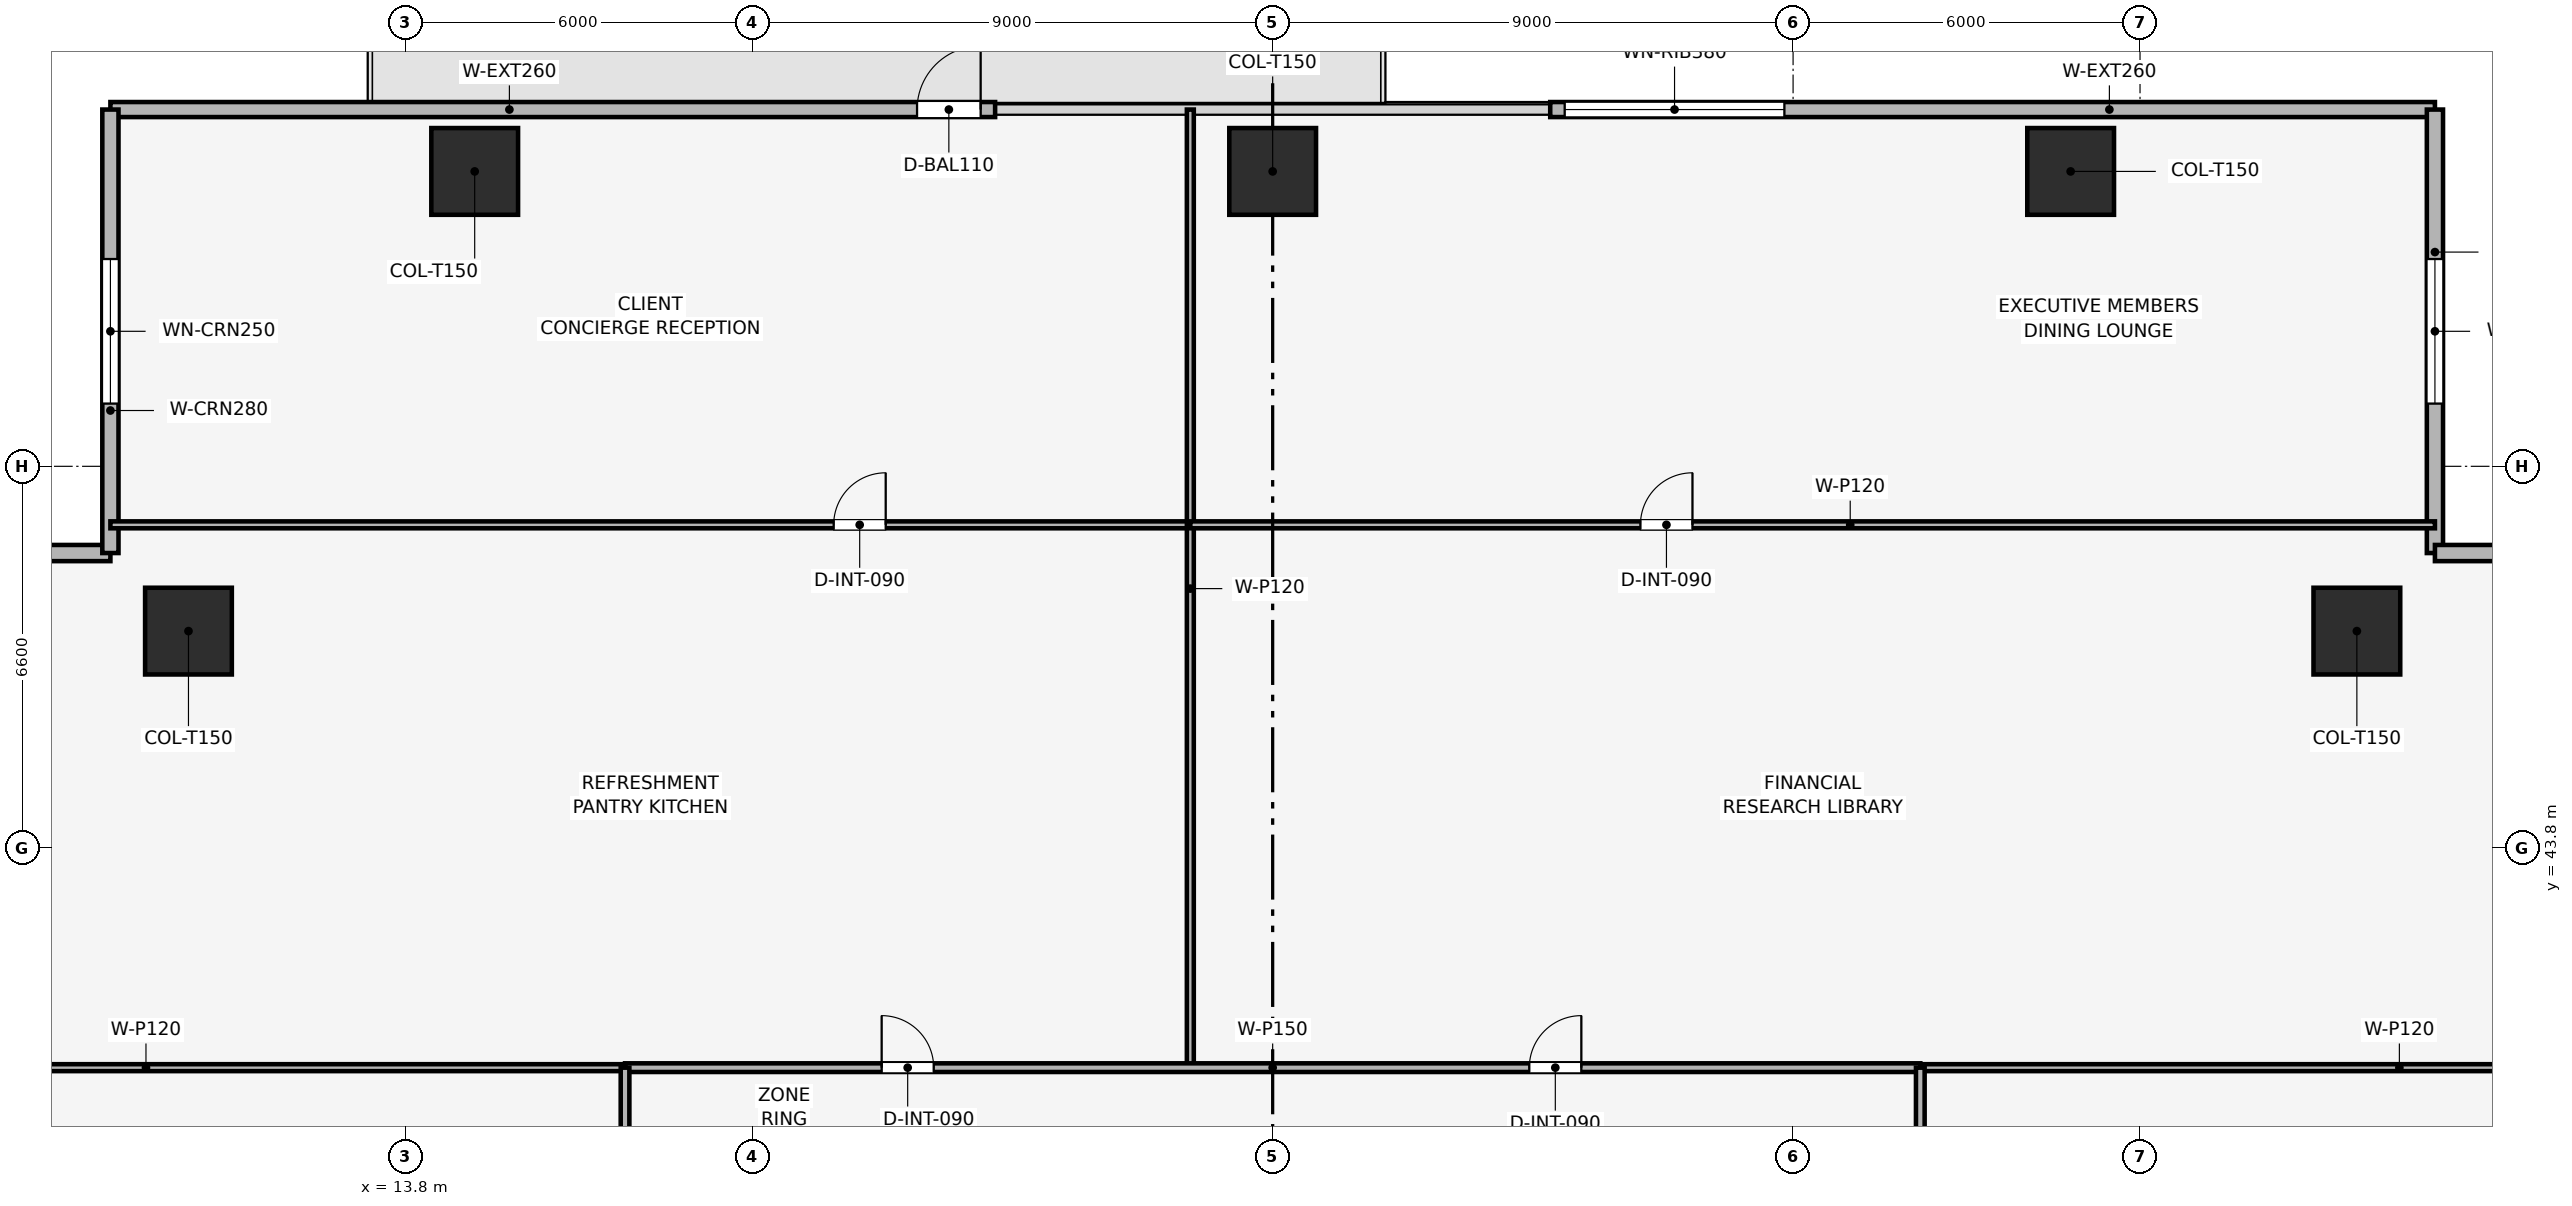
"""IFC4 building model, lengths in metres.
Left out: names, types, materials, properties, quantities, classifications, styles, units other than length and angle.
Written with IfcOpenShell. Run it as: python <this file> out.ifc"""

import sys

from ifc_helpers import new_model, si_unit, direction, frame, frame_2d, origin, origin_2d, place, context, subcontext, project, spatial, rectangle, extrude, element, fill, save


model = new_model("IFC4")
c1 = context("Model", 3, precision=1e-05, world=origin(), true_north=direction((0.0, 1.0)))
c2 = subcontext(c1, "Body", "Model", "MODEL_VIEW")
j1 = project(units=[si_unit("LENGTHUNIT", "METRE"), si_unit("PLANEANGLEUNIT", "RADIAN")], contexts=[c1])
p1 = place(None, origin())
s1 = spatial("IfcSite", under=j1, at=p1, CompositionType="ELEMENT")
p2 = place(p1, origin())
s2 = spatial("IfcBuilding", under=s1, at=p2, CompositionType="ELEMENT")
p3 = place(p2, frame((0.0, 0.0, 49.5)))
s3 = spatial("IfcBuildingStorey", under=s2, at=p3, CompositionType="ELEMENT", Elevation=49.5)
for number, where, z_axis, x_axis in (
    (1, (42.6, 55.5, 0.003), (0.0, 0.0, 1.0), (1.0, 0.0, 0.0)),
    (2, (28.8, 55.5, 0.003), (0.0, 0.0, 1.0), (1.0, 0.0, 0.0)),
    (3, (15.0, 55.5, 0.003), (0.0, 0.0, 1.0), (1.0, 0.0, 0.0)),
    (4, (47.55, 47.55, 0.003), (0.0, 0.0, 1.0), (1.0, 0.0, 0.0)),
    (5, (10.05, 47.55, 0.003), (0.0, 0.0, 1.0), (1.0, 0.0, 0.0)),
):
    element("IfcColumn", number, at=place(p3, frame(where, z_axis=z_axis, x_axis=x_axis)), inside=s3, PredefinedType="COLUMN", context=c2, shape_type="SweptSolid", body=[
        extrude(rectangle(XDim=1.5, YDim=1.5, at=origin_2d()), origin(), (0.0, 0.0, 1.0), 3.644),
    ])
p4 = place(p3, frame((8.7, 56.57, 0.0), z_axis=(0.0, 0.0, 1.0), x_axis=(1.0, 0.0, 0.0)))
e6 = element("IfcWall", 6, at=p4, inside=s3, PredefinedType="SOLIDWALL", context=c2, shape_type="SweptSolid", body=[
    extrude(rectangle(XDim=15.3, YDim=0.26, at=frame_2d((7.65, 0.0))), origin(), (0.0, 0.0, 1.0), 3.65),
])
p5 = place(p4, frame((13.95, 0.0, 0.0)))
e7 = element("IfcOpeningElement", 7, at=p5, cuts=e6, PredefinedType="OPENING", context=c2, shape_type="SweptSolid", body=[
    extrude(rectangle(XDim=1.1, YDim=2.2, at=frame_2d((0.55, 1.1))), frame((0.0, 0.14, 0.0), z_axis=(0.0, -1.0, 0.0), x_axis=(1.0, 0.0, 0.0)), (0.0, 0.0, 1.0), 0.28),
])
p6 = place(p3, frame((33.6, 56.57, 0.0), z_axis=(0.0, 0.0, 1.0), x_axis=(1.0, 0.0, 0.0)))
e8 = element("IfcWall", 8, at=p6, inside=s3, PredefinedType="SOLIDWALL", context=c2, shape_type="SweptSolid", body=[
    extrude(rectangle(XDim=15.3, YDim=0.26, at=frame_2d((7.65, 0.0))), origin(), (0.0, 0.0, 1.0), 3.65),
])
p7 = place(p6, frame((0.25, 0.0, 0.9)))
e9 = element("IfcOpeningElement", 9, at=p7, cuts=e8, PredefinedType="OPENING", context=c2, shape_type="SweptSolid", body=[
    extrude(rectangle(XDim=3.8, YDim=1.9, at=frame_2d((1.9, 0.95))), frame((0.0, 0.14, 0.0), z_axis=(0.0, -1.0, 0.0), x_axis=(1.0, 0.0, 0.0)), (0.0, 0.0, 1.0), 0.28),
])
p8 = place(p3, frame((1.03, 48.9, 0.0), z_axis=(0.0, 0.0, 1.0), x_axis=(1.0, 0.0, 0.0)))
e10 = element("IfcWall", 10, at=p8, inside=s3, PredefinedType="SOLIDWALL", context=c2, shape_type="SweptSolid", body=[
    extrude(rectangle(XDim=7.67, YDim=0.28, at=frame_2d((3.835, 0.0))), origin(), (0.0, 0.0, 1.0), 3.65),
])
p9 = place(p8, frame((2.585, 0.0, 0.9)))
e11 = element("IfcOpeningElement", 11, at=p9, cuts=e10, PredefinedType="OPENING", context=c2, shape_type="SweptSolid", body=[
    extrude(rectangle(XDim=2.5, YDim=1.9, at=frame_2d((1.25, 0.95))), frame((0.0, 0.15, 0.0), z_axis=(0.0, -1.0, 0.0), x_axis=(1.0, 0.0, 0.0)), (0.0, 0.0, 1.0), 0.3),
])
p10 = place(p3, frame((8.7, 48.9, 0.0), z_axis=(0.0, 0.0, 1.0), x_axis=(0.0, 1.0, 0.0)))
e12 = element("IfcWall", 12, at=p10, inside=s3, PredefinedType="SOLIDWALL", context=c2, shape_type="SweptSolid", body=[
    extrude(rectangle(XDim=7.67, YDim=0.28, at=frame_2d((3.835, 0.0))), origin(), (0.0, 0.0, 1.0), 3.65),
])
p11 = place(p10, frame((2.585, 0.0, 0.9)))
e13 = element("IfcOpeningElement", 13, at=p11, cuts=e12, PredefinedType="OPENING", context=c2, shape_type="SweptSolid", body=[
    extrude(rectangle(XDim=2.5, YDim=1.9, at=frame_2d((1.25, 0.95))), frame((0.0, 0.15, 0.0), z_axis=(0.0, -1.0, 0.0), x_axis=(1.0, 0.0, 0.0)), (0.0, 0.0, 1.0), 0.3),
])
p12 = place(p3, frame((48.9, 56.57, 0.0), z_axis=(0.0, 0.0, 1.0), x_axis=(0.0, -1.0, 0.0)))
e14 = element("IfcWall", 14, at=p12, inside=s3, PredefinedType="SOLIDWALL", context=c2, shape_type="SweptSolid", body=[
    extrude(rectangle(XDim=7.67, YDim=0.28, at=frame_2d((3.835, 0.0))), origin(), (0.0, 0.0, 1.0), 3.65),
])
p13 = place(p12, frame((2.585, 0.0, 0.9)))
e15 = element("IfcOpeningElement", 15, at=p13, cuts=e14, PredefinedType="OPENING", context=c2, shape_type="SweptSolid", body=[
    extrude(rectangle(XDim=2.5, YDim=1.9, at=frame_2d((1.25, 0.95))), frame((0.0, 0.15, 0.0), z_axis=(0.0, -1.0, 0.0), x_axis=(1.0, 0.0, 0.0)), (0.0, 0.0, 1.0), 0.3),
])
p14 = place(p3, frame((48.9, 48.9, 0.0), z_axis=(0.0, 0.0, 1.0), x_axis=(1.0, 0.0, 0.0)))
e16 = element("IfcWall", 16, at=p14, inside=s3, PredefinedType="SOLIDWALL", context=c2, shape_type="SweptSolid", body=[
    extrude(rectangle(XDim=7.67, YDim=0.28, at=frame_2d((3.835, 0.0))), origin(), (0.0, 0.0, 1.0), 3.65),
])
p15 = place(p14, frame((2.585, 0.0, 0.9)))
e17 = element("IfcOpeningElement", 17, at=p15, cuts=e16, PredefinedType="OPENING", context=c2, shape_type="SweptSolid", body=[
    extrude(rectangle(XDim=2.5, YDim=1.9, at=frame_2d((1.25, 0.95))), frame((0.0, 0.15, 0.0), z_axis=(0.0, -1.0, 0.0), x_axis=(1.0, 0.0, 0.0)), (0.0, 0.0, 1.0), 0.3),
])
p16 = place(p3, frame((8.7, 49.388, 0.0), z_axis=(0.0, 0.0, 1.0), x_axis=(1.0, 0.0, 0.0)))
e18 = element("IfcWall", 18, at=p16, inside=s3, PredefinedType="PARTITIONING", context=c2, shape_type="SweptSolid", body=[
    extrude(rectangle(XDim=18.676, YDim=0.12, at=frame_2d((9.338, 0.0))), origin(), (0.0, 0.0, 1.0), 2.935),
])
p17 = place(p16, frame((12.508, 0.0, 0.0)))
e19 = element("IfcOpeningElement", 19, at=p17, cuts=e18, PredefinedType="OPENING", context=c2, shape_type="SweptSolid", body=[
    extrude(rectangle(XDim=0.9, YDim=2.1, at=frame_2d((0.45, 1.05))), frame((0.0, 0.07, 0.0), z_axis=(0.0, -1.0, 0.0), x_axis=(1.0, 0.0, 0.0)), (0.0, 0.0, 1.0), 0.14),
])
p18 = place(p3, frame((27.376, 40.0, 0.0), z_axis=(0.0, 0.0, 1.0), x_axis=(0.0, 1.0, 0.0)))
e20 = element("IfcWall", 20, at=p18, inside=s3, PredefinedType="PARTITIONING", context=c2, shape_type="SweptSolid", body=[
    extrude(rectangle(XDim=16.57, YDim=0.12, at=frame_2d((8.285, 0.0))), origin(), (0.0, 0.0, 1.0), 2.935),
])
p19 = place(p3, frame((27.376, 49.388, 0.0), z_axis=(0.0, 0.0, 1.0), x_axis=(1.0, 0.0, 0.0)))
e21 = element("IfcWall", 21, at=p19, inside=s3, PredefinedType="PARTITIONING", context=c2, shape_type="SweptSolid", body=[
    extrude(rectangle(XDim=21.524, YDim=0.12, at=frame_2d((10.762, 0.0))), origin(), (0.0, 0.0, 1.0), 2.935),
])
p20 = place(p19, frame((7.784, 0.0, 0.0)))
e22 = element("IfcOpeningElement", 22, at=p20, cuts=e21, PredefinedType="OPENING", context=c2, shape_type="SweptSolid", body=[
    extrude(rectangle(XDim=0.9, YDim=2.1, at=frame_2d((0.45, 1.05))), frame((0.0, 0.07, 0.0), z_axis=(0.0, -1.0, 0.0), x_axis=(1.0, 0.0, 0.0)), (0.0, 0.0, 1.0), 0.14),
])
for number, where, z_axis, x_axis in (
    (23, (1.03, 40.0, 0.0), (0.0, 0.0, 1.0), (1.0, 0.0, 0.0)),
    (24, (40.0, 40.0, 0.0), (0.0, 0.0, 1.0), (1.0, 0.0, 0.0)),
):
    element("IfcWall", number, at=place(p3, frame(where, z_axis=z_axis, x_axis=x_axis)), inside=s3, PredefinedType="PARTITIONING", context=c2, shape_type="SweptSolid", body=[
        extrude(rectangle(XDim=16.57, YDim=0.12, at=frame_2d((8.285, 0.0))), origin(), (0.0, 0.0, 1.0), 2.935),
    ])
p21 = place(p3, frame((17.6, 40.0, 0.0), z_axis=(0.0, 0.0, 1.0), x_axis=(1.0, 0.0, 0.0)))
e25 = element("IfcWall", 25, at=p21, inside=s3, PredefinedType="PARTITIONING", context=c2, shape_type="SweptSolid", body=[
    extrude(rectangle(XDim=22.4, YDim=0.15, at=frame_2d((11.2, 0.0))), origin(), (0.0, 0.0, 1.0), 3.085),
])
p22 = place(p21, frame((4.438, 0.0, 0.0)))
e26 = element("IfcOpeningElement", 26, at=p22, cuts=e25, PredefinedType="OPENING", context=c2, shape_type="SweptSolid", body=[
    extrude(rectangle(XDim=0.9, YDim=2.1, at=frame_2d((0.45, 1.05))), frame((0.0, 0.085, 0.0), z_axis=(0.0, -1.0, 0.0), x_axis=(1.0, 0.0, 0.0)), (0.0, 0.0, 1.0), 0.17),
])
p23 = place(p21, frame((15.638, 0.0, 0.0)))
e27 = element("IfcOpeningElement", 27, at=p23, cuts=e25, PredefinedType="OPENING", context=c2, shape_type="SweptSolid", body=[
    extrude(rectangle(XDim=0.9, YDim=2.1, at=frame_2d((0.45, 1.05))), frame((0.0, 0.085, 0.0), z_axis=(0.0, -1.0, 0.0), x_axis=(1.0, 0.0, 0.0)), (0.0, 0.0, 1.0), 0.17),
])
p24 = place(p3, frame((17.6, 17.6, 0.0), z_axis=(0.0, 0.0, 1.0), x_axis=(0.0, 1.0, 0.0)))
e28 = element("IfcWall", 28, at=p24, inside=s3, PredefinedType="PARTITIONING", context=c2, shape_type="SweptSolid", body=[
    extrude(rectangle(XDim=22.4, YDim=0.15, at=frame_2d((11.2, 0.0))), origin(), (0.0, 0.0, 1.0), 3.085),
])
p25 = place(p24, frame((1.4, 0.0, 0.0)))
e29 = element("IfcOpeningElement", 29, at=p25, cuts=e28, PredefinedType="OPENING", context=c2, shape_type="SweptSolid", body=[
    extrude(rectangle(XDim=0.9, YDim=2.1, at=frame_2d((0.45, 1.05))), frame((0.0, 0.085, 0.0), z_axis=(0.0, -1.0, 0.0), x_axis=(1.0, 0.0, 0.0)), (0.0, 0.0, 1.0), 0.17),
])
p26 = place(p24, frame((4.65, 0.0, 0.0)))
e30 = element("IfcOpeningElement", 30, at=p26, cuts=e28, PredefinedType="OPENING", context=c2, shape_type="SweptSolid", body=[
    extrude(rectangle(XDim=0.9, YDim=2.1, at=frame_2d((0.45, 1.05))), frame((0.0, 0.085, 0.0), z_axis=(0.0, -1.0, 0.0), x_axis=(1.0, 0.0, 0.0)), (0.0, 0.0, 1.0), 0.17),
])
p27 = place(p24, frame((7.55, 0.0, 0.0)))
e31 = element("IfcOpeningElement", 31, at=p27, cuts=e28, PredefinedType="OPENING", context=c2, shape_type="SweptSolid", body=[
    extrude(rectangle(XDim=0.9, YDim=2.1, at=frame_2d((0.45, 1.05))), frame((0.0, 0.085, 0.0), z_axis=(0.0, -1.0, 0.0), x_axis=(1.0, 0.0, 0.0)), (0.0, 0.0, 1.0), 0.17),
])
p28 = place(p24, frame((10.3, 0.0, 0.0)))
e32 = element("IfcOpeningElement", 32, at=p28, cuts=e28, PredefinedType="OPENING", context=c2, shape_type="SweptSolid", body=[
    extrude(rectangle(XDim=0.95, YDim=2.1, at=frame_2d((0.475, 1.05))), frame((0.0, 0.085, 0.0), z_axis=(0.0, -1.0, 0.0), x_axis=(1.0, 0.0, 0.0)), (0.0, 0.0, 1.0), 0.17),
])
p29 = place(p24, frame((16.8, 0.0, 0.0)))
e33 = element("IfcOpeningElement", 33, at=p29, cuts=e28, PredefinedType="OPENING", context=c2, shape_type="SweptSolid", body=[
    extrude(rectangle(XDim=0.9, YDim=2.1, at=frame_2d((0.45, 1.05))), frame((0.0, 0.085, 0.0), z_axis=(0.0, -1.0, 0.0), x_axis=(1.0, 0.0, 0.0)), (0.0, 0.0, 1.0), 0.17),
])
p30 = place(p3, frame((40.0, 17.6, 0.0), z_axis=(0.0, 0.0, 1.0), x_axis=(0.0, 1.0, 0.0)))
e34 = element("IfcWall", 34, at=p30, inside=s3, PredefinedType="PARTITIONING", context=c2, shape_type="SweptSolid", body=[
    extrude(rectangle(XDim=22.4, YDim=0.15, at=frame_2d((11.2, 0.0))), origin(), (0.0, 0.0, 1.0), 3.085),
])
p31 = place(p30, frame((0.7, 0.0, 0.0)))
e35 = element("IfcOpeningElement", 35, at=p31, cuts=e34, PredefinedType="OPENING", context=c2, shape_type="SweptSolid", body=[
    extrude(rectangle(XDim=0.9, YDim=2.1, at=frame_2d((0.45, 1.05))), frame((0.0, 0.085, 0.0), z_axis=(0.0, -1.0, 0.0), x_axis=(1.0, 0.0, 0.0)), (0.0, 0.0, 1.0), 0.17),
])
p32 = place(p30, frame((4.927, 0.0, 0.0)))
e36 = element("IfcOpeningElement", 36, at=p32, cuts=e34, PredefinedType="OPENING", context=c2, shape_type="SweptSolid", body=[
    extrude(rectangle(XDim=0.9, YDim=2.1, at=frame_2d((0.45, 1.05))), frame((0.0, 0.085, 0.0), z_axis=(0.0, -1.0, 0.0), x_axis=(1.0, 0.0, 0.0)), (0.0, 0.0, 1.0), 0.17),
])
p33 = place(p30, frame((10.886, 0.0, 0.0)))
e37 = element("IfcOpeningElement", 37, at=p33, cuts=e34, PredefinedType="OPENING", context=c2, shape_type="SweptSolid", body=[
    extrude(rectangle(XDim=0.9, YDim=2.1, at=frame_2d((0.45, 1.05))), frame((0.0, 0.085, 0.0), z_axis=(0.0, -1.0, 0.0), x_axis=(1.0, 0.0, 0.0)), (0.0, 0.0, 1.0), 0.17),
])
p34 = place(p30, frame((17.859, 0.0, 0.0)))
e38 = element("IfcOpeningElement", 38, at=p34, cuts=e34, PredefinedType="OPENING", context=c2, shape_type="SweptSolid", body=[
    extrude(rectangle(XDim=0.9, YDim=2.1, at=frame_2d((0.45, 1.05))), frame((0.0, 0.085, 0.0), z_axis=(0.0, -1.0, 0.0), x_axis=(1.0, 0.0, 0.0)), (0.0, 0.0, 1.0), 0.17),
])
p35 = place(p5, origin())
e39 = element("IfcDoor", 39, at=p35, inside=s3, OperationType="SINGLE_SWING_RIGHT", PredefinedType="DOOR", context=c2, shape_type="SweptSolid", body=[
    extrude(rectangle(XDim=1.1, YDim=2.2, at=frame_2d((0.55, 1.1))), frame((0.0, 0.025, 0.0), z_axis=(0.0, -1.0, 0.0), x_axis=(1.0, 0.0, 0.0)), (0.0, 0.0, 1.0), 0.05),
])
fill(e7, e39)
p36 = place(p7, origin())
e40 = element("IfcWindow", 40, at=p36, inside=s3, PartitioningType="SINGLE_PANEL", PredefinedType="WINDOW", context=c2, shape_type="SweptSolid", body=[
    extrude(rectangle(XDim=3.8, YDim=1.9, at=frame_2d((1.9, 0.95))), frame((0.0, 0.03, 0.0), z_axis=(0.0, -1.0, 0.0), x_axis=(1.0, 0.0, 0.0)), (0.0, 0.0, 1.0), 0.06),
])
fill(e9, e40)
p37 = place(p11, origin())
e41 = element("IfcWindow", 41, at=p37, inside=s3, PartitioningType="SINGLE_PANEL", PredefinedType="WINDOW", context=c2, shape_type="SweptSolid", body=[
    extrude(rectangle(XDim=2.5, YDim=1.9, at=frame_2d((1.25, 0.95))), frame((0.0, 0.03, 0.0), z_axis=(0.0, -1.0, 0.0), x_axis=(1.0, 0.0, 0.0)), (0.0, 0.0, 1.0), 0.06),
])
fill(e13, e41)
p38 = place(p13, origin())
e42 = element("IfcWindow", 42, at=p38, inside=s3, PartitioningType="SINGLE_PANEL", PredefinedType="WINDOW", context=c2, shape_type="SweptSolid", body=[
    extrude(rectangle(XDim=2.5, YDim=1.9, at=frame_2d((1.25, 0.95))), frame((0.0, 0.03, 0.0), z_axis=(0.0, -1.0, 0.0), x_axis=(1.0, 0.0, 0.0)), (0.0, 0.0, 1.0), 0.06),
])
fill(e15, e42)
p39 = place(p17, origin())
e43 = element("IfcDoor", 43, at=p39, inside=s3, OperationType="SINGLE_SWING_RIGHT", PredefinedType="DOOR", context=c2, shape_type="SweptSolid", body=[
    extrude(rectangle(XDim=0.9, YDim=2.1, at=frame_2d((0.45, 1.05))), frame((0.0, 0.025, 0.0), z_axis=(0.0, -1.0, 0.0), x_axis=(1.0, 0.0, 0.0)), (0.0, 0.0, 1.0), 0.05),
])
fill(e19, e43)
p40 = place(p20, origin())
e44 = element("IfcDoor", 44, at=p40, inside=s3, OperationType="SINGLE_SWING_RIGHT", PredefinedType="DOOR", context=c2, shape_type="SweptSolid", body=[
    extrude(rectangle(XDim=0.9, YDim=2.1, at=frame_2d((0.45, 1.05))), frame((0.0, 0.025, 0.0), z_axis=(0.0, -1.0, 0.0), x_axis=(1.0, 0.0, 0.0)), (0.0, 0.0, 1.0), 0.05),
])
fill(e22, e44)
p41 = place(p22, origin())
e45 = element("IfcDoor", 45, at=p41, inside=s3, OperationType="SINGLE_SWING_LEFT", PredefinedType="DOOR", context=c2, shape_type="SweptSolid", body=[
    extrude(rectangle(XDim=0.9, YDim=2.1, at=frame_2d((0.45, 1.05))), frame((0.0, 0.025, 0.0), z_axis=(0.0, -1.0, 0.0), x_axis=(1.0, 0.0, 0.0)), (0.0, 0.0, 1.0), 0.05),
])
fill(e26, e45)
p42 = place(p23, origin())
e46 = element("IfcDoor", 46, at=p42, inside=s3, OperationType="SINGLE_SWING_RIGHT", PredefinedType="DOOR", context=c2, shape_type="SweptSolid", body=[
    extrude(rectangle(XDim=0.9, YDim=2.1, at=frame_2d((0.45, 1.05))), frame((0.0, 0.025, 0.0), z_axis=(0.0, -1.0, 0.0), x_axis=(1.0, 0.0, 0.0)), (0.0, 0.0, 1.0), 0.05),
])
fill(e27, e46)
save(model, sys.argv[1])
